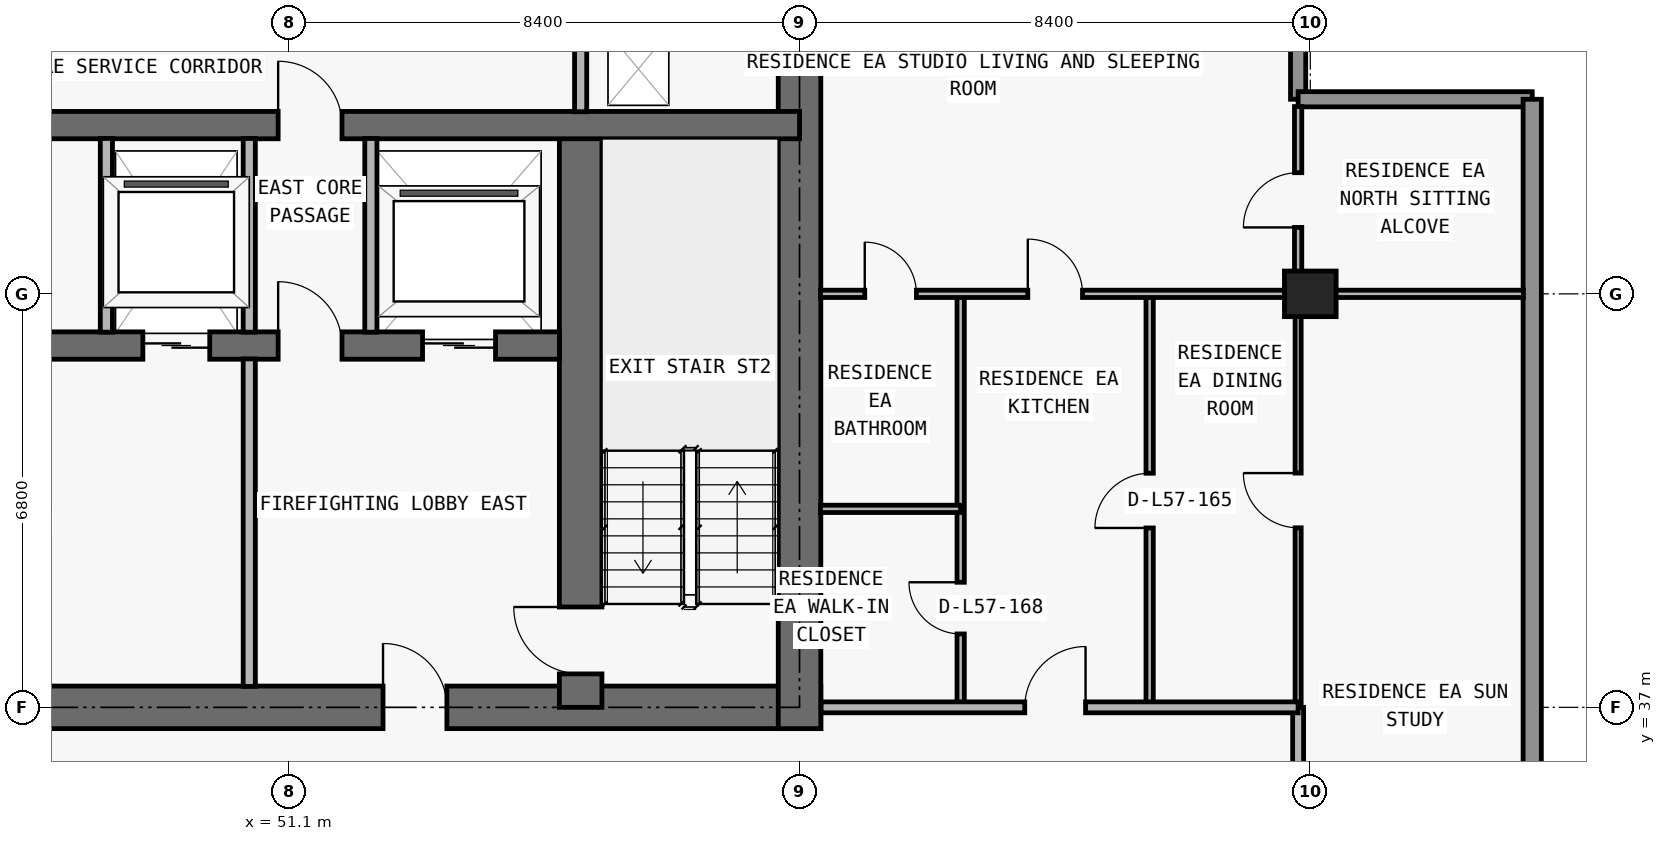
"""IFC4 building model, lengths in metres.
Left out: names, types, materials, properties, quantities, classifications, styles, units other than length and angle.
Written with IfcOpenShell. Run it as: python <this file> out.ifc"""

import sys

from ifc_helpers import new_model, si_unit, direction, frame, frame_2d, origin, origin_2d, place, context, subcontext, project, spatial, rectangle, extrude, element, fill, save


model = new_model("IFC4")
c1 = context("Model", 3, precision=1e-05, world=origin(), true_north=direction((0.0, 1.0)))
c2 = subcontext(c1, "Body", "Model", "MODEL_VIEW")
j1 = project(units=[si_unit("LENGTHUNIT", "METRE"), si_unit("PLANEANGLEUNIT", "RADIAN")], contexts=[c1])
p1 = place(None, origin())
s1 = spatial("IfcSite", under=j1, at=p1, CompositionType="ELEMENT")
p2 = place(p1, origin())
s2 = spatial("IfcBuilding", under=s1, at=p2, CompositionType="ELEMENT")
p3 = place(p2, frame((0.0, 0.0, 204.9)))
s3 = spatial("IfcBuildingStorey", under=s2, at=p3, CompositionType="ELEMENT", Elevation=204.9)
p4 = place(p3, frame((67.9, 43.8, 0.0), z_axis=(0.0, 0.0, 1.0), x_axis=(1.0, 0.0, 0.0)))
e1 = element("IfcColumn", 1, at=p4, inside=s3, PredefinedType="COLUMN", context=c2, shape_type="SweptSolid", body=[
    extrude(rectangle(XDim=0.85, YDim=0.75, at=origin_2d()), origin(), (0.0, 0.0, 1.0), 3.05),
])
p5 = place(p3, frame((17.95, 37.0, 0.0), z_axis=(0.0, 0.0, 1.0), x_axis=(1.0, 0.0, 0.0)))
e2 = element("IfcWall", 2, at=p5, inside=s3, PredefinedType="SHEAR", context=c2, shape_type="SweptSolid", body=[
    extrude(rectangle(XDim=41.9, YDim=0.7, at=frame_2d((20.95, 0.0))), origin(), (0.0, 0.0, 1.0), 3.05),
])
p6 = place(p5, frame((14.35, 0.0, 0.0)))
e3 = element("IfcOpeningElement", 3, at=p6, cuts=e2, PredefinedType="OPENING", context=c2, shape_type="SweptSolid", body=[
    extrude(rectangle(XDim=1.1, YDim=2.15, at=frame_2d((0.55, 1.075))), frame((0.0, 0.36, 0.0), z_axis=(0.0, -1.0, 0.0), x_axis=(1.0, 0.0, 0.0)), (0.0, 0.0, 1.0), 0.72),
])
p7 = place(p5, frame((6.2, 0.0, 0.0)))
e4 = element("IfcOpeningElement", 4, at=p7, cuts=e2, PredefinedType="OPENING", context=c2, shape_type="SweptSolid", body=[
    extrude(rectangle(XDim=1.05, YDim=2.15, at=frame_2d((0.525, 1.075))), frame((0.0, 0.36, 0.0), z_axis=(0.0, -1.0, 0.0), x_axis=(1.0, 0.0, 0.0)), (0.0, 0.0, 1.0), 0.72),
])
p8 = place(p5, frame((34.7, 0.0, 0.0)))
e5 = element("IfcOpeningElement", 5, at=p8, cuts=e2, PredefinedType="OPENING", context=c2, shape_type="SweptSolid", body=[
    extrude(rectangle(XDim=1.05, YDim=2.15, at=frame_2d((0.525, 1.075))), frame((0.0, 0.36, 0.0), z_axis=(0.0, -1.0, 0.0), x_axis=(1.0, 0.0, 0.0)), (0.0, 0.0, 1.0), 0.72),
])
p9 = place(p5, frame((10.812, 0.0, 0.0)))
e6 = element("IfcOpeningElement", 6, at=p9, cuts=e2, PredefinedType="OPENING", context=c2, shape_type="SweptSolid", body=[
    extrude(rectangle(XDim=1.05, YDim=2.15, at=frame_2d((0.525, 1.075))), frame((0.0, 0.36, 0.0), z_axis=(0.0, -1.0, 0.0), x_axis=(1.0, 0.0, 0.0)), (0.0, 0.0, 1.0), 0.72),
])
p10 = place(p5, frame((24.05, 0.0, 0.0)))
e7 = element("IfcOpeningElement", 7, at=p10, cuts=e2, PredefinedType="OPENING", context=c2, shape_type="SweptSolid", body=[
    extrude(rectangle(XDim=1.05, YDim=2.15, at=frame_2d((0.525, 1.075))), frame((0.0, 0.36, 0.0), z_axis=(0.0, -1.0, 0.0), x_axis=(1.0, 0.0, 0.0)), (0.0, 0.0, 1.0), 0.72),
])
p11 = place(p3, frame((59.5, 36.65, 0.0), z_axis=(0.0, 0.0, 1.0), x_axis=(0.0, 1.0, 0.0)))
e8 = element("IfcWall", 8, at=p11, inside=s3, PredefinedType="SHEAR", context=c2, shape_type="SweptSolid", body=[
    extrude(rectangle(XDim=13.95, YDim=0.7, at=frame_2d((6.975, 0.0))), origin(), (0.0, 0.0, 1.0), 3.05),
])
p12 = place(p3, frame((55.9, 37.0, 0.0), z_axis=(0.0, 0.0, 1.0), x_axis=(0.0, 1.0, 0.0)))
e9 = element("IfcWall", 9, at=p12, inside=s3, PredefinedType="SHEAR", context=c2, shape_type="SweptSolid", body=[
    extrude(rectangle(XDim=9.575, YDim=0.7, at=frame_2d((4.788, 0.0))), origin(), (0.0, 0.0, 1.0), 3.05),
])
p13 = place(p12, frame((0.55, 0.0, 0.0)))
e10 = element("IfcOpeningElement", 10, at=p13, cuts=e9, PredefinedType="OPENING", context=c2, shape_type="SweptSolid", body=[
    extrude(rectangle(XDim=1.1, YDim=2.15, at=frame_2d((0.55, 1.075))), frame((0.0, 0.36, 0.0), z_axis=(0.0, -1.0, 0.0), x_axis=(1.0, 0.0, 0.0)), (0.0, 0.0, 1.0), 0.72),
])
p14 = place(p3, frame((22.25, 42.95, 0.0), z_axis=(0.0, 0.0, 1.0), x_axis=(1.0, 0.0, 0.0)))
e11 = element("IfcWall", 11, at=p14, inside=s3, PredefinedType="SHEAR", context=c2, shape_type="SweptSolid", body=[
    extrude(rectangle(XDim=33.3, YDim=0.45, at=frame_2d((16.65, 0.0))), origin(), (0.0, 0.0, 1.0), 3.05),
])
p15 = place(p14, frame((1.05, 0.0, 0.0)))
e12 = element("IfcOpeningElement", 12, at=p15, cuts=e11, PredefinedType="OPENING", context=c2, shape_type="SweptSolid", body=[
    extrude(rectangle(XDim=1.2, YDim=2.2, at=frame_2d((0.6, 1.1))), frame((0.0, 0.235, 0.0), z_axis=(0.0, -1.0, 0.0), x_axis=(1.0, 0.0, 0.0)), (0.0, 0.0, 1.0), 0.47),
])
p16 = place(p14, frame((31.05, 0.0, 0.0)))
e13 = element("IfcOpeningElement", 13, at=p16, cuts=e11, PredefinedType="OPENING", context=c2, shape_type="SweptSolid", body=[
    extrude(rectangle(XDim=1.2, YDim=2.2, at=frame_2d((0.6, 1.1))), frame((0.0, 0.235, 0.0), z_axis=(0.0, -1.0, 0.0), x_axis=(1.0, 0.0, 0.0)), (0.0, 0.0, 1.0), 0.47),
])
p17 = place(p14, frame((26.45, 0.0, 0.0)))
e14 = element("IfcOpeningElement", 14, at=p17, cuts=e11, PredefinedType="OPENING", context=c2, shape_type="SweptSolid", body=[
    extrude(rectangle(XDim=1.1, YDim=2.2, at=frame_2d((0.55, 1.1))), frame((0.0, 0.235, 0.0), z_axis=(0.0, -1.0, 0.0), x_axis=(1.0, 0.0, 0.0)), (0.0, 0.0, 1.0), 0.47),
])
p18 = place(p14, frame((5.95, 0.0, 0.0)))
e15 = element("IfcOpeningElement", 15, at=p18, cuts=e11, PredefinedType="OPENING", context=c2, shape_type="SweptSolid", body=[
    extrude(rectangle(XDim=1.1, YDim=2.2, at=frame_2d((0.55, 1.1))), frame((0.0, 0.235, 0.0), z_axis=(0.0, -1.0, 0.0), x_axis=(1.0, 0.0, 0.0)), (0.0, 0.0, 1.0), 0.47),
])
p19 = place(p14, frame((3.625, 0.0, 0.0)))
e16 = element("IfcOpeningElement", 16, at=p19, cuts=e11, PredefinedType="OPENING", context=c2, shape_type="SweptSolid", body=[
    extrude(rectangle(XDim=1.05, YDim=2.15, at=frame_2d((0.525, 1.075))), frame((0.0, 0.235, 0.0), z_axis=(0.0, -1.0, 0.0), x_axis=(1.0, 0.0, 0.0)), (0.0, 0.0, 1.0), 0.47),
])
p20 = place(p14, frame((28.675, 0.0, 0.0)))
e17 = element("IfcOpeningElement", 17, at=p20, cuts=e11, PredefinedType="OPENING", context=c2, shape_type="SweptSolid", body=[
    extrude(rectangle(XDim=1.05, YDim=2.15, at=frame_2d((0.525, 1.075))), frame((0.0, 0.235, 0.0), z_axis=(0.0, -1.0, 0.0), x_axis=(1.0, 0.0, 0.0)), (0.0, 0.0, 1.0), 0.47),
])
p21 = place(p14, frame((14.7, 0.0, 0.0)))
e18 = element("IfcOpeningElement", 18, at=p21, cuts=e11, PredefinedType="OPENING", context=c2, shape_type="SweptSolid", body=[
    extrude(rectangle(XDim=1.0, YDim=2.2, at=frame_2d((0.5, 1.1))), frame((0.0, 0.235, 0.0), z_axis=(0.0, -1.0, 0.0), x_axis=(1.0, 0.0, 0.0)), (0.0, 0.0, 1.0), 0.47),
])
p22 = place(p14, frame((21.45, 0.0, 0.0)))
e19 = element("IfcOpeningElement", 19, at=p22, cuts=e11, PredefinedType="OPENING", context=c2, shape_type="SweptSolid", body=[
    extrude(rectangle(XDim=1.0, YDim=2.2, at=frame_2d((0.5, 1.1))), frame((0.0, 0.235, 0.0), z_axis=(0.0, -1.0, 0.0), x_axis=(1.0, 0.0, 0.0)), (0.0, 0.0, 1.0), 0.47),
])
p23 = place(p3, frame((18.3, 46.575, 0.0), z_axis=(0.0, 0.0, 1.0), x_axis=(1.0, 0.0, 0.0)))
e20 = element("IfcWall", 20, at=p23, inside=s3, PredefinedType="SHEAR", context=c2, shape_type="SweptSolid", body=[
    extrude(rectangle(XDim=41.2, YDim=0.45, at=frame_2d((20.6, 0.0))), origin(), (0.0, 0.0, 1.0), 3.05),
])
p24 = place(p23, frame((7.6, 0.0, 0.0)))
e21 = element("IfcOpeningElement", 21, at=p24, cuts=e20, PredefinedType="OPENING", context=c2, shape_type="SweptSolid", body=[
    extrude(rectangle(XDim=1.0, YDim=2.2, at=frame_2d((0.5, 1.1))), frame((0.0, 0.235, 0.0), z_axis=(0.0, -1.0, 0.0), x_axis=(1.0, 0.0, 0.0)), (0.0, 0.0, 1.0), 0.47),
])
p25 = place(p23, frame((32.625, 0.0, 0.0)))
e22 = element("IfcOpeningElement", 22, at=p25, cuts=e20, PredefinedType="OPENING", context=c2, shape_type="SweptSolid", body=[
    extrude(rectangle(XDim=1.05, YDim=2.15, at=frame_2d((0.525, 1.075))), frame((0.0, 0.235, 0.0), z_axis=(0.0, -1.0, 0.0), x_axis=(1.0, 0.0, 0.0)), (0.0, 0.0, 1.0), 0.47),
])
p26 = place(p3, frame((67.7, 50.45, 0.0), z_axis=(0.0, 0.0, 1.0), x_axis=(0.0, -1.0, 0.0)))
e23 = element("IfcWall", 23, at=p26, inside=s3, PredefinedType="ELEMENTEDWALL", context=c2, shape_type="SweptSolid", body=[
    extrude(rectangle(XDim=3.45, YDim=0.25, at=frame_2d((1.725, 0.0))), origin(), (0.0, 0.0, 1.0), 3.05),
])
p27 = place(p3, frame((67.7, 47.0, 0.0), z_axis=(0.0, 0.0, 1.0), x_axis=(1.0, 0.0, 0.0)))
e24 = element("IfcWall", 24, at=p27, inside=s3, PredefinedType="ELEMENTEDWALL", context=c2, shape_type="SweptSolid", body=[
    extrude(rectangle(XDim=3.85, YDim=0.25, at=frame_2d((1.925, 0.0))), origin(), (0.0, 0.0, 1.0), 3.05),
])
p28 = place(p3, frame((71.55, 47.0, 0.0), z_axis=(0.0, 0.0, 1.0), x_axis=(0.0, -1.0, 0.0)))
e25 = element("IfcWall", 25, at=p28, inside=s3, PredefinedType="STANDARD", context=c2, shape_type="SweptSolid", body=[
    extrude(rectangle(XDim=17.9, YDim=0.3, at=frame_2d((8.95, 0.0))), origin(), (0.0, 0.0, 1.0), 3.05),
])
p29 = place(p3, frame((48.1, 43.17, 0.0), z_axis=(0.0, 0.0, 1.0), x_axis=(0.0, 1.0, 0.0)))
e26 = element("IfcWall", 26, at=p29, inside=s3, PredefinedType="PARTITIONING", context=c2, shape_type="SweptSolid", body=[
    extrude(rectangle(XDim=3.185, YDim=0.2, at=frame_2d((1.593, 0.0))), origin(), (0.0, 0.0, 1.0), 3.05),
])
p30 = place(p3, frame((50.45, 37.345, 0.0), z_axis=(0.0, 0.0, 1.0), x_axis=(0.0, 1.0, 0.0)))
e27 = element("IfcWall", 27, at=p30, inside=s3, PredefinedType="PARTITIONING", context=c2, shape_type="SweptSolid", body=[
    extrude(rectangle(XDim=5.385, YDim=0.2, at=frame_2d((2.692, 0.0))), origin(), (0.0, 0.0, 1.0), 3.05),
])
for number, where, z_axis, x_axis in (
    (28, (50.45, 43.17, 0.0), (0.0, 0.0, 1.0), (0.0, 1.0, 0.0)),
    (29, (52.45, 43.17, 0.0), (0.0, 0.0, 1.0), (0.0, 1.0, 0.0)),
):
    element("IfcWall", number, at=place(p3, frame(where, z_axis=z_axis, x_axis=x_axis)), inside=s3, PredefinedType="PARTITIONING", context=c2, shape_type="SweptSolid", body=[
        extrude(rectangle(XDim=3.185, YDim=0.2, at=frame_2d((1.593, 0.0))), origin(), (0.0, 0.0, 1.0), 3.05),
    ])
p31 = place(p3, frame((55.9, 46.795, 0.0), z_axis=(0.0, 0.0, 1.0), x_axis=(0.0, 1.0, 0.0)))
e30 = element("IfcWall", 30, at=p31, inside=s3, PredefinedType="PARTITIONING", context=c2, shape_type="SweptSolid", body=[
    extrude(rectangle(XDim=3.16, YDim=0.2, at=frame_2d((1.58, 0.0))), origin(), (0.0, 0.0, 1.0), 3.05),
])
p32 = place(p3, frame((62.15, 37.0, 0.0), z_axis=(0.0, 0.0, 1.0), x_axis=(0.0, 1.0, 0.0)))
e31 = element("IfcWall", 31, at=p32, inside=s3, PredefinedType="PARTITIONING", context=c2, shape_type="SweptSolid", body=[
    extrude(rectangle(XDim=6.8, YDim=0.12, at=frame_2d((3.4, 0.0))), origin(), (0.0, 0.0, 1.0), 3.05),
])
p33 = place(p32, frame((1.207, 0.0, 0.0)))
e32 = element("IfcOpeningElement", 32, at=p33, cuts=e31, PredefinedType="OPENING", context=c2, shape_type="SweptSolid", body=[
    extrude(rectangle(XDim=0.85, YDim=2.1, at=frame_2d((0.425, 1.05))), frame((0.0, 0.07, 0.0), z_axis=(0.0, -1.0, 0.0), x_axis=(1.0, 0.0, 0.0)), (0.0, 0.0, 1.0), 0.14),
])
p34 = place(p3, frame((65.258, 37.0, 0.0), z_axis=(0.0, 0.0, 1.0), x_axis=(0.0, 1.0, 0.0)))
e33 = element("IfcWall", 33, at=p34, inside=s3, PredefinedType="PARTITIONING", context=c2, shape_type="SweptSolid", body=[
    extrude(rectangle(XDim=6.8, YDim=0.12, at=frame_2d((3.4, 0.0))), origin(), (0.0, 0.0, 1.0), 3.05),
])
p35 = place(p34, frame((2.95, 0.0, 0.0)))
e34 = element("IfcOpeningElement", 34, at=p35, cuts=e33, PredefinedType="OPENING", context=c2, shape_type="SweptSolid", body=[
    extrude(rectangle(XDim=0.9, YDim=2.15, at=frame_2d((0.45, 1.075))), frame((0.0, 0.07, 0.0), z_axis=(0.0, -1.0, 0.0), x_axis=(1.0, 0.0, 0.0)), (0.0, 0.0, 1.0), 0.14),
])
p36 = place(p3, frame((67.7, 34.005, 0.0), z_axis=(0.0, 0.0, 1.0), x_axis=(0.0, 1.0, 0.0)))
e35 = element("IfcWall", 35, at=p36, inside=s3, PredefinedType="PARTITIONING", context=c2, shape_type="SweptSolid", body=[
    extrude(rectangle(XDim=2.995, YDim=0.18, at=frame_2d((1.498, 0.0))), origin(), (0.0, 0.0, 1.0), 2.263),
])
p37 = place(p3, frame((67.7, 37.005, 0.0), z_axis=(0.0, 0.0, 1.0), x_axis=(0.0, 1.0, 0.0)))
e36 = element("IfcWall", 36, at=p37, inside=s3, PredefinedType="MOVABLE", context=c2, shape_type="SweptSolid", body=[
    extrude(rectangle(XDim=6.795, YDim=0.1, at=frame_2d((3.397, 0.0))), origin(), (0.0, 0.0, 1.0), 2.263),
])
p38 = place(p37, frame((2.948, 0.0, 0.0)))
e37 = element("IfcOpeningElement", 37, at=p38, cuts=e36, PredefinedType="OPENING", context=c2, shape_type="SweptSolid", body=[
    extrude(rectangle(XDim=0.9, YDim=2.15, at=frame_2d((0.45, 1.075))), frame((0.0, 0.06, 0.0), z_axis=(0.0, -1.0, 0.0), x_axis=(1.0, 0.0, 0.0)), (0.0, 0.0, 1.0), 0.12),
])
p39 = place(p3, frame((67.7, 43.805, 0.0), z_axis=(0.0, 0.0, 1.0), x_axis=(0.0, 1.0, 0.0)))
e38 = element("IfcWall", 38, at=p39, inside=s3, PredefinedType="PARTITIONING", context=c2, shape_type="SweptSolid", body=[
    extrude(rectangle(XDim=3.075, YDim=0.12, at=frame_2d((1.538, 0.0))), origin(), (0.0, 0.0, 1.0), 3.05),
])
p40 = place(p39, frame((1.087, 0.0, 0.0)))
e39 = element("IfcOpeningElement", 39, at=p40, cuts=e38, PredefinedType="OPENING", context=c2, shape_type="SweptSolid", body=[
    extrude(rectangle(XDim=0.9, YDim=2.15, at=frame_2d((0.45, 1.075))), frame((0.0, 0.07, 0.0), z_axis=(0.0, -1.0, 0.0), x_axis=(1.0, 0.0, 0.0)), (0.0, 0.0, 1.0), 0.14),
])
p41 = place(p3, frame((59.855, 37.0, 0.0), z_axis=(0.0, 0.0, 1.0), x_axis=(1.0, 0.0, 0.0)))
e40 = element("IfcWall", 40, at=p41, inside=s3, PredefinedType="PARTITIONING", context=c2, shape_type="SweptSolid", body=[
    extrude(rectangle(XDim=7.845, YDim=0.18, at=frame_2d((3.922, 0.0))), origin(), (0.0, 0.0, 1.0), 3.05),
])
p42 = place(p41, frame((3.349, 0.0, 0.0)))
e41 = element("IfcOpeningElement", 41, at=p42, cuts=e40, PredefinedType="OPENING", context=c2, shape_type="SweptSolid", body=[
    extrude(rectangle(XDim=1.0, YDim=2.2, at=frame_2d((0.5, 1.1))), frame((0.0, 0.1, 0.0), z_axis=(0.0, -1.0, 0.0), x_axis=(1.0, 0.0, 0.0)), (0.0, 0.0, 1.0), 0.2),
])
p43 = place(p3, frame((59.845, 40.264, 0.0), z_axis=(0.0, 0.0, 1.0), x_axis=(1.0, 0.0, 0.0)))
e42 = element("IfcWall", 42, at=p43, inside=s3, PredefinedType="PARTITIONING", context=c2, shape_type="SweptSolid", body=[
    extrude(rectangle(XDim=2.305, YDim=0.12, at=frame_2d((1.152, 0.0))), origin(), (0.0, 0.0, 1.0), 3.05),
])
p44 = place(p3, frame((59.845, 43.8, 0.0), z_axis=(0.0, 0.0, 1.0), x_axis=(1.0, 0.0, 0.0)))
e43 = element("IfcWall", 43, at=p44, inside=s3, PredefinedType="PARTITIONING", context=c2, shape_type="SweptSolid", body=[
    extrude(rectangle(XDim=11.56, YDim=0.12, at=frame_2d((5.78, 0.0))), origin(), (0.0, 0.0, 1.0), 2.418),
])
p45 = place(p44, frame((3.409, 0.0, 0.0)))
e44 = element("IfcOpeningElement", 44, at=p45, cuts=e43, PredefinedType="OPENING", context=c2, shape_type="SweptSolid", body=[
    extrude(rectangle(XDim=0.9, YDim=2.15, at=frame_2d((0.45, 1.075))), frame((0.0, 0.07, 0.0), z_axis=(0.0, -1.0, 0.0), x_axis=(1.0, 0.0, 0.0)), (0.0, 0.0, 1.0), 0.14),
])
p46 = place(p44, frame((0.728, 0.0, 0.0)))
e45 = element("IfcOpeningElement", 45, at=p46, cuts=e43, PredefinedType="OPENING", context=c2, shape_type="SweptSolid", body=[
    extrude(rectangle(XDim=0.85, YDim=2.1, at=frame_2d((0.425, 1.05))), frame((0.0, 0.07, 0.0), z_axis=(0.0, -1.0, 0.0), x_axis=(1.0, 0.0, 0.0)), (0.0, 0.0, 1.0), 0.14),
])
p47 = place(p16, origin())
e46 = element("IfcDoor", 46, at=p47, inside=s3, OperationType="DOUBLE_DOOR_SLIDING", PredefinedType="DOOR", context=c2, shape_type="SweptSolid", body=[
    extrude(rectangle(XDim=1.2, YDim=2.2, at=frame_2d((0.6, 1.1))), frame((0.0, 0.025, 0.0), z_axis=(0.0, -1.0, 0.0), x_axis=(1.0, 0.0, 0.0)), (0.0, 0.0, 1.0), 0.05),
])
fill(e13, e46)
p48 = place(p17, origin())
e47 = element("IfcDoor", 47, at=p48, inside=s3, OperationType="DOUBLE_DOOR_SLIDING", PredefinedType="DOOR", context=c2, shape_type="SweptSolid", body=[
    extrude(rectangle(XDim=1.1, YDim=2.2, at=frame_2d((0.55, 1.1))), frame((0.0, 0.025, 0.0), z_axis=(0.0, -1.0, 0.0), x_axis=(1.0, 0.0, 0.0)), (0.0, 0.0, 1.0), 0.05),
])
fill(e14, e47)
p49 = place(p8, origin())
e48 = element("IfcDoor", 48, at=p49, inside=s3, OperationType="SINGLE_SWING_LEFT", PredefinedType="DOOR", context=c2, shape_type="SweptSolid", body=[
    extrude(rectangle(XDim=1.05, YDim=2.15, at=frame_2d((0.525, 1.075))), frame((0.0, 0.025, 0.0), z_axis=(0.0, -1.0, 0.0), x_axis=(1.0, 0.0, 0.0)), (0.0, 0.0, 1.0), 0.05),
])
fill(e5, e48)
p50 = place(p13, origin())
e49 = element("IfcDoor", 49, at=p50, inside=s3, OperationType="SINGLE_SWING_RIGHT", PredefinedType="DOOR", context=c2, shape_type="SweptSolid", body=[
    extrude(rectangle(XDim=1.1, YDim=2.15, at=frame_2d((0.55, 1.075))), frame((0.0, 0.025, 0.0), z_axis=(0.0, -1.0, 0.0), x_axis=(1.0, 0.0, 0.0)), (0.0, 0.0, 1.0), 0.05),
])
fill(e10, e49)
p51 = place(p20, origin())
e50 = element("IfcDoor", 50, at=p51, inside=s3, OperationType="SINGLE_SWING_LEFT", PredefinedType="DOOR", context=c2, shape_type="SweptSolid", body=[
    extrude(rectangle(XDim=1.05, YDim=2.15, at=frame_2d((0.525, 1.075))), frame((0.0, 0.025, 0.0), z_axis=(0.0, -1.0, 0.0), x_axis=(1.0, 0.0, 0.0)), (0.0, 0.0, 1.0), 0.05),
])
fill(e17, e50)
p52 = place(p25, origin())
e51 = element("IfcDoor", 51, at=p52, inside=s3, OperationType="SINGLE_SWING_LEFT", PredefinedType="DOOR", context=c2, shape_type="SweptSolid", body=[
    extrude(rectangle(XDim=1.05, YDim=2.15, at=frame_2d((0.525, 1.075))), frame((0.0, 0.025, 0.0), z_axis=(0.0, -1.0, 0.0), x_axis=(1.0, 0.0, 0.0)), (0.0, 0.0, 1.0), 0.05),
])
fill(e22, e51)
p53 = place(p35, origin())
e52 = element("IfcDoor", 52, at=p53, inside=s3, OperationType="SINGLE_SWING_LEFT", PredefinedType="DOOR", context=c2, shape_type="SweptSolid", body=[
    extrude(rectangle(XDim=0.9, YDim=2.15, at=frame_2d((0.45, 1.075))), frame((0.0, 0.025, 0.0), z_axis=(0.0, -1.0, 0.0), x_axis=(1.0, 0.0, 0.0)), (0.0, 0.0, 1.0), 0.05),
])
fill(e34, e52)
p54 = place(p42, origin())
e53 = element("IfcDoor", 53, at=p54, inside=s3, OperationType="SINGLE_SWING_RIGHT", PredefinedType="DOOR", context=c2, shape_type="SweptSolid", body=[
    extrude(rectangle(XDim=1.0, YDim=2.2, at=frame_2d((0.5, 1.1))), frame((0.0, 0.025, 0.0), z_axis=(0.0, -1.0, 0.0), x_axis=(1.0, 0.0, 0.0)), (0.0, 0.0, 1.0), 0.05),
])
fill(e41, e53)
p55 = place(p45, origin())
e54 = element("IfcDoor", 54, at=p55, inside=s3, OperationType="SINGLE_SWING_LEFT", PredefinedType="DOOR", context=c2, shape_type="SweptSolid", body=[
    extrude(rectangle(XDim=0.9, YDim=2.15, at=frame_2d((0.45, 1.075))), frame((0.0, 0.025, 0.0), z_axis=(0.0, -1.0, 0.0), x_axis=(1.0, 0.0, 0.0)), (0.0, 0.0, 1.0), 0.05),
])
fill(e44, e54)
p56 = place(p33, origin())
e55 = element("IfcDoor", 55, at=p56, inside=s3, OperationType="SINGLE_SWING_RIGHT", PredefinedType="DOOR", context=c2, shape_type="SweptSolid", body=[
    extrude(rectangle(XDim=0.85, YDim=2.1, at=frame_2d((0.425, 1.05))), frame((0.0, 0.025, 0.0), z_axis=(0.0, -1.0, 0.0), x_axis=(1.0, 0.0, 0.0)), (0.0, 0.0, 1.0), 0.05),
])
fill(e32, e55)
p57 = place(p46, origin())
e56 = element("IfcDoor", 56, at=p57, inside=s3, OperationType="SINGLE_SWING_LEFT", PredefinedType="DOOR", context=c2, shape_type="SweptSolid", body=[
    extrude(rectangle(XDim=0.85, YDim=2.1, at=frame_2d((0.425, 1.05))), frame((0.0, 0.025, 0.0), z_axis=(0.0, -1.0, 0.0), x_axis=(1.0, 0.0, 0.0)), (0.0, 0.0, 1.0), 0.05),
])
fill(e45, e56)
p58 = place(p38, origin())
e57 = element("IfcDoor", 57, at=p58, inside=s3, OperationType="SINGLE_SWING_RIGHT", PredefinedType="DOOR", context=c2, shape_type="SweptSolid", body=[
    extrude(rectangle(XDim=0.9, YDim=2.15, at=frame_2d((0.45, 1.075))), frame((0.0, 0.025, 0.0), z_axis=(0.0, -1.0, 0.0), x_axis=(1.0, 0.0, 0.0)), (0.0, 0.0, 1.0), 0.05),
])
fill(e37, e57)
p59 = place(p40, origin())
e58 = element("IfcDoor", 58, at=p59, inside=s3, OperationType="SINGLE_SWING_LEFT", PredefinedType="DOOR", context=c2, shape_type="SweptSolid", body=[
    extrude(rectangle(XDim=0.9, YDim=2.15, at=frame_2d((0.45, 1.075))), frame((0.0, 0.025, 0.0), z_axis=(0.0, -1.0, 0.0), x_axis=(1.0, 0.0, 0.0)), (0.0, 0.0, 1.0), 0.05),
])
fill(e39, e58)
save(model, sys.argv[1])
